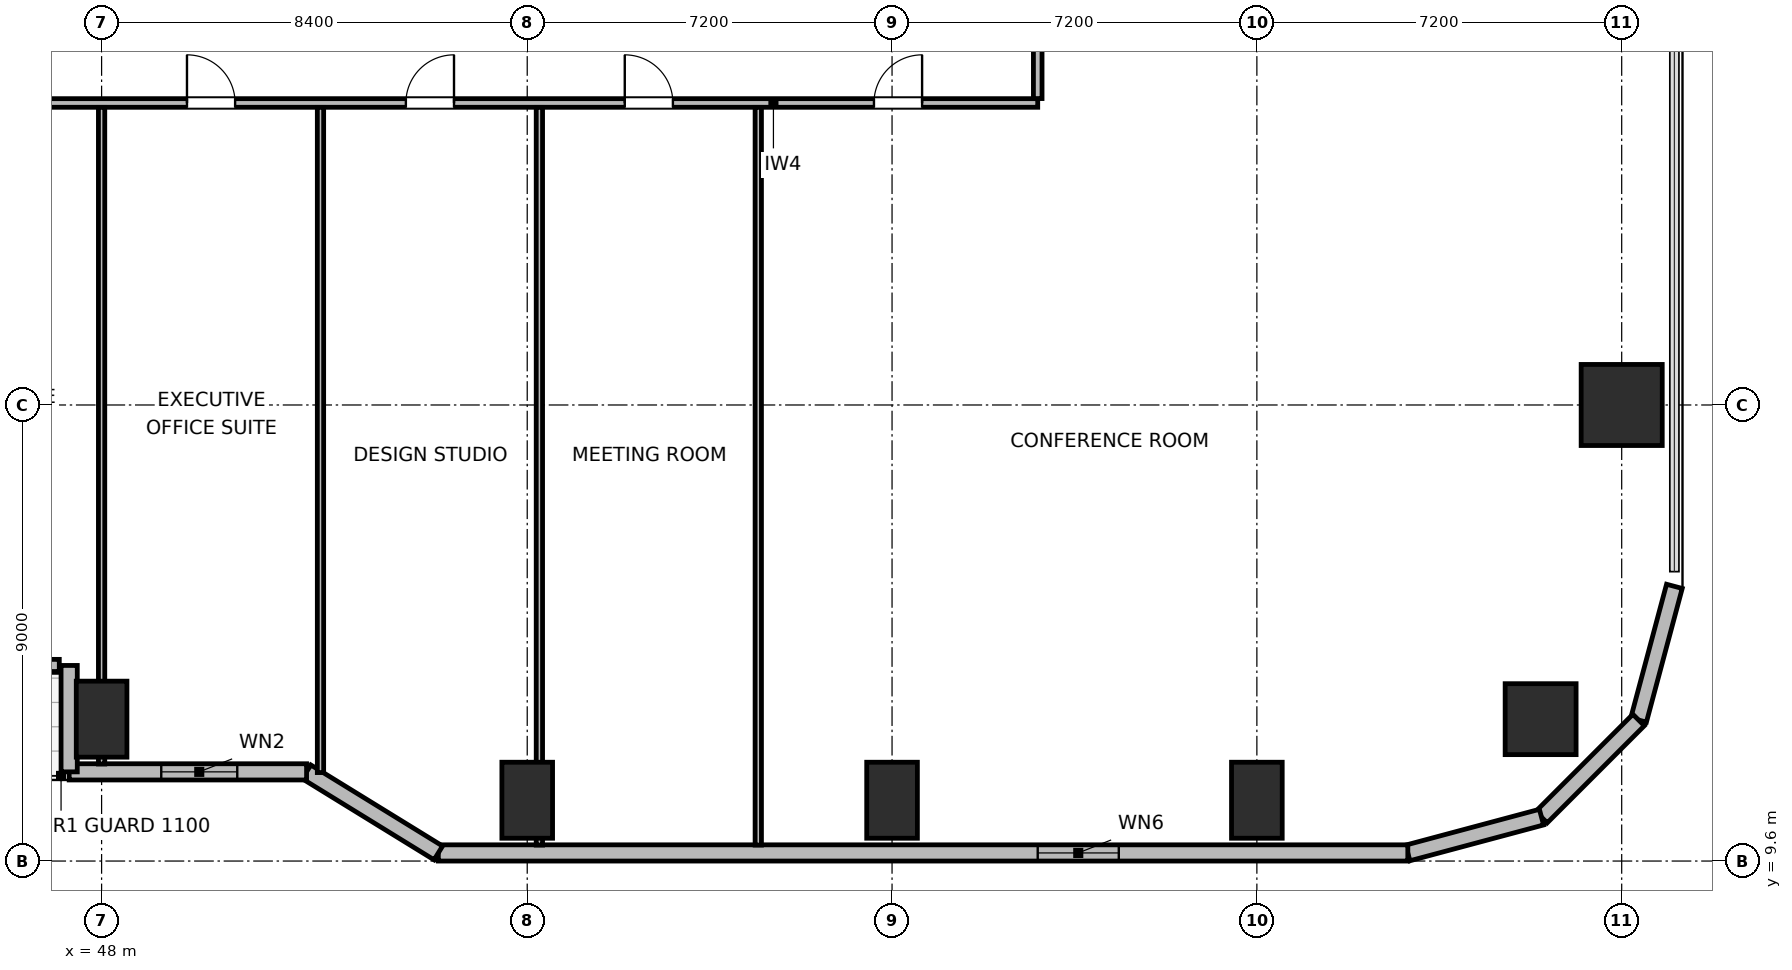
"""IFC4 building model, lengths in metres.
Left out: names, types, materials, properties, quantities, classifications, styles, units other than length and angle.
Written with IfcOpenShell. Run it as: python <this file> out.ifc"""

import sys

from ifc_helpers import new_model, si_unit, direction, frame, frame_2d, origin, origin_2d, place, context, subcontext, project, spatial, rectangle, circle, extrude, element, fill, save


model = new_model("IFC4")
c1 = context("Model", 3, precision=1e-05, world=origin(), true_north=direction((0.0, 1.0)))
c2 = subcontext(c1, "Body", "Model", "MODEL_VIEW")
j1 = project(units=[si_unit("LENGTHUNIT", "METRE"), si_unit("PLANEANGLEUNIT", "RADIAN")], contexts=[c1])
p1 = place(None, origin())
s1 = spatial("IfcSite", under=j1, at=p1, CompositionType="ELEMENT")
p2 = place(p1, origin())
s2 = spatial("IfcBuilding", under=s1, at=p2, CompositionType="ELEMENT")
p3 = place(p2, frame((0.0, 0.0, 60.6)))
s3 = spatial("IfcBuildingStorey", under=s2, at=p3, CompositionType="ELEMENT", Elevation=60.6)
p4 = place(p3, frame((76.4, 12.4, 0.0), z_axis=(0.0, 0.0, 1.0), x_axis=(1.0, 0.0, 0.0)))
e1 = element("IfcColumn", 1, at=p4, inside=s3, PredefinedType="COLUMN", context=c2, shape_type="SweptSolid", body=[
    extrude(circle(Radius=0.7, at=origin_2d()), origin(), (0.0, 0.0, 1.0), 3.9),
])
for number, where, z_axis, x_axis in (
    (2, (48.0, 12.4, 0.0), (0.0, 0.0, 1.0), (1.0, 0.0, 0.0)),
    (3, (56.4, 10.8, 0.0), (0.0, 0.0, 1.0), (1.0, 0.0, 0.0)),
    (4, (63.6, 10.8, 0.0), (0.0, 0.0, 1.0), (1.0, 0.0, 0.0)),
    (5, (70.8, 10.8, 0.0), (0.0, 0.0, 1.0), (1.0, 0.0, 0.0)),
):
    element("IfcColumn", number, at=place(p3, frame(where, z_axis=z_axis, x_axis=x_axis)), inside=s3, PredefinedType="COLUMN", context=c2, shape_type="SweptSolid", body=[
        extrude(rectangle(XDim=1.0, YDim=1.5, at=origin_2d()), origin(), (0.0, 0.0, 1.0), 3.9),
    ])
p5 = place(p3, frame((78.0, 18.6, 0.0), z_axis=(0.0, 0.0, 1.0), x_axis=(1.0, 0.0, 0.0)))
e6 = element("IfcColumn", 6, at=p5, inside=s3, PredefinedType="COLUMN", context=c2, shape_type="SweptSolid", body=[
    extrude(rectangle(XDim=1.6, YDim=1.6, at=origin_2d()), origin(), (0.0, 0.0, 1.0), 3.9),
])
p6 = place(p3, frame((79.04, 15.021, 0.0), z_axis=(0.0, 0.0, 1.0), x_axis=(-0.25869736047, -0.965958423373, 0.0)))
e7 = element("IfcWall", 7, at=p6, inside=s3, PredefinedType="SOLIDWALL", context=c2, shape_type="SweptSolid", body=[
    extrude(rectangle(XDim=2.731, YDim=0.32, at=frame_2d((1.366, 0.0))), origin(), (0.0, 0.0, 1.0), 3.64),
])
p7 = place(p3, frame((78.333, 12.383, 0.0), z_axis=(0.0, 0.0, 1.0), x_axis=(-0.707106781187, -0.707106781187, 0.0)))
e8 = element("IfcWall", 8, at=p7, inside=s3, PredefinedType="SOLIDWALL", context=c2, shape_type="SweptSolid", body=[
    extrude(rectangle(XDim=2.71, YDim=0.32, at=frame_2d((1.355, 0.0))), origin(), (0.0, 0.0, 1.0), 3.64),
])
p8 = place(p3, frame((76.417, 10.467, 0.0), z_axis=(0.0, 0.0, 1.0), x_axis=(-0.965964405026, -0.25867502435, 0.0)))
e9 = element("IfcWall", 9, at=p8, inside=s3, PredefinedType="SOLIDWALL", context=c2, shape_type="SweptSolid", body=[
    extrude(rectangle(XDim=2.731, YDim=0.32, at=frame_2d((1.366, 0.0))), origin(), (0.0, 0.0, 1.0), 3.64),
])
p9 = place(p3, frame((73.779, 9.76, 0.0), z_axis=(0.0, 0.0, 1.0), x_axis=(-1.0, 0.0, 0.0)))
e10 = element("IfcWall", 10, at=p9, inside=s3, PredefinedType="SOLIDWALL", context=c2, shape_type="SweptSolid", body=[
    extrude(rectangle(XDim=19.134, YDim=0.32, at=frame_2d((9.567, 0.0))), origin(), (0.0, 0.0, 1.0), 3.64),
])
p10 = place(p9, frame((5.704, 0.0, 0.85)))
e11 = element("IfcOpeningElement", 11, at=p10, cuts=e10, PredefinedType="OPENING", context=c2, shape_type="SweptSolid", body=[
    extrude(rectangle(XDim=1.6, YDim=1.0, at=frame_2d((0.8, 0.5))), frame((0.0, 0.17, 0.0), z_axis=(0.0, -1.0, 0.0), x_axis=(1.0, 0.0, 0.0)), (0.0, 0.0, 1.0), 0.34),
])
p11 = place(p3, frame((54.645, 9.76, 0.0), z_axis=(0.0, 0.0, 1.0), x_axis=(-0.851630857047, 0.524142044989, 0.0)))
e12 = element("IfcWall", 12, at=p11, inside=s3, PredefinedType="SOLIDWALL", context=c2, shape_type="SweptSolid", body=[
    extrude(rectangle(XDim=3.053, YDim=0.32, at=frame_2d((1.526, 0.0))), origin(), (0.0, 0.0, 1.0), 2.875),
])
p12 = place(p3, frame((52.045, 11.36, 0.0), z_axis=(0.0, 0.0, 1.0), x_axis=(-1.0, 0.0, 0.0)))
e13 = element("IfcWall", 13, at=p12, inside=s3, PredefinedType="SOLIDWALL", context=c2, shape_type="SweptSolid", body=[
    extrude(rectangle(XDim=4.685, YDim=0.32, at=frame_2d((2.343, 0.0))), origin(), (0.0, 0.0, 1.0), 2.875),
])
p13 = place(p12, frame((1.368, 0.0, 0.85)))
e14 = element("IfcOpeningElement", 14, at=p13, cuts=e13, PredefinedType="OPENING", context=c2, shape_type="SweptSolid", body=[
    extrude(rectangle(XDim=1.5, YDim=1.1, at=frame_2d((0.75, 0.55))), frame((0.0, 0.17, 0.0), z_axis=(0.0, -1.0, 0.0), x_axis=(1.0, 0.0, 0.0)), (0.0, 0.0, 1.0), 0.34),
])
p14 = place(p3, frame((47.36, 11.36, 0.0), z_axis=(0.0, 0.0, 1.0), x_axis=(0.0, 1.0, 0.0)))
e15 = element("IfcWall", 15, at=p14, inside=s3, PredefinedType="SOLIDWALL", context=c2, shape_type="SweptSolid", body=[
    extrude(rectangle(XDim=2.1, YDim=0.32, at=frame_2d((1.05, 0.0))), origin(), (0.0, 0.0, 1.0), 2.875),
])
p15 = place(p3, frame((47.165, 13.46, 0.0), z_axis=(0.0, 0.0, 1.0), x_axis=(-1.0, 0.0, 0.0)))
e16 = element("IfcWall", 16, at=p15, inside=s3, PredefinedType="SOLIDWALL", context=c2, shape_type="SweptSolid", body=[
    extrude(rectangle(XDim=4.53, YDim=0.24, at=frame_2d((2.265, 0.0))), origin(), (0.0, 0.0, 1.0), 3.64),
])
p16 = place(p15, frame((1.715, 0.0, 0.0)))
e17 = element("IfcOpeningElement", 17, at=p16, cuts=e16, PredefinedType="OPENING", context=c2, shape_type="SweptSolid", body=[
    extrude(rectangle(XDim=1.1, YDim=2.04, at=frame_2d((0.55, 1.02))), frame((0.0, 0.13, 0.0), z_axis=(0.0, -1.0, 0.0), x_axis=(1.0, 0.0, 0.0)), (0.0, 0.0, 1.0), 0.26),
])
p17 = place(p3, frame((29.525, 24.56, 0.0), z_axis=(0.0, 0.0, 1.0), x_axis=(1.0, 0.0, 0.0)))
e18 = element("IfcWall", 18, at=p17, inside=s3, PredefinedType="PARTITIONING", context=c2, shape_type="SweptSolid", body=[
    extrude(rectangle(XDim=36.95, YDim=0.17, at=frame_2d((18.475, 0.0))), origin(), (0.0, 0.0, 1.0), 3.64),
])
p18 = place(p17, frame((2.283, 0.0, 0.0)))
e19 = element("IfcOpeningElement", 19, at=p18, cuts=e18, PredefinedType="OPENING", context=c2, shape_type="SweptSolid", body=[
    extrude(rectangle(XDim=0.95, YDim=2.04, at=frame_2d((0.475, 1.02))), frame((0.0, 0.095, 0.0), z_axis=(0.0, -1.0, 0.0), x_axis=(1.0, 0.0, 0.0)), (0.0, 0.0, 1.0), 0.19),
])
p19 = place(p17, frame((7.2, 0.0, 0.0)))
e20 = element("IfcOpeningElement", 20, at=p19, cuts=e18, PredefinedType="OPENING", context=c2, shape_type="SweptSolid", body=[
    extrude(rectangle(XDim=0.95, YDim=2.04, at=frame_2d((0.475, 1.02))), frame((0.0, 0.095, 0.0), z_axis=(0.0, -1.0, 0.0), x_axis=(1.0, 0.0, 0.0)), (0.0, 0.0, 1.0), 0.19),
])
p20 = place(p17, frame((11.52, 0.0, 0.0)))
e21 = element("IfcOpeningElement", 21, at=p20, cuts=e18, PredefinedType="OPENING", context=c2, shape_type="SweptSolid", body=[
    extrude(rectangle(XDim=0.95, YDim=2.04, at=frame_2d((0.475, 1.02))), frame((0.0, 0.095, 0.0), z_axis=(0.0, -1.0, 0.0), x_axis=(1.0, 0.0, 0.0)), (0.0, 0.0, 1.0), 0.19),
])
p21 = place(p17, frame((15.84, 0.0, 0.0)))
e22 = element("IfcOpeningElement", 22, at=p21, cuts=e18, PredefinedType="OPENING", context=c2, shape_type="SweptSolid", body=[
    extrude(rectangle(XDim=0.95, YDim=2.04, at=frame_2d((0.475, 1.02))), frame((0.0, 0.095, 0.0), z_axis=(0.0, -1.0, 0.0), x_axis=(1.0, 0.0, 0.0)), (0.0, 0.0, 1.0), 0.19),
])
p22 = place(p17, frame((20.16, 0.0, 0.0)))
e23 = element("IfcOpeningElement", 23, at=p22, cuts=e18, PredefinedType="OPENING", context=c2, shape_type="SweptSolid", body=[
    extrude(rectangle(XDim=0.95, YDim=2.04, at=frame_2d((0.475, 1.02))), frame((0.0, 0.095, 0.0), z_axis=(0.0, -1.0, 0.0), x_axis=(1.0, 0.0, 0.0)), (0.0, 0.0, 1.0), 0.19),
])
p23 = place(p17, frame((24.48, 0.0, 0.0)))
e24 = element("IfcOpeningElement", 24, at=p23, cuts=e18, PredefinedType="OPENING", context=c2, shape_type="SweptSolid", body=[
    extrude(rectangle(XDim=0.95, YDim=2.04, at=frame_2d((0.475, 1.02))), frame((0.0, 0.095, 0.0), z_axis=(0.0, -1.0, 0.0), x_axis=(1.0, 0.0, 0.0)), (0.0, 0.0, 1.0), 0.19),
])
p24 = place(p17, frame((28.8, 0.0, 0.0)))
e25 = element("IfcOpeningElement", 25, at=p24, cuts=e18, PredefinedType="OPENING", context=c2, shape_type="SweptSolid", body=[
    extrude(rectangle(XDim=0.95, YDim=2.04, at=frame_2d((0.475, 1.02))), frame((0.0, 0.095, 0.0), z_axis=(0.0, -1.0, 0.0), x_axis=(1.0, 0.0, 0.0)), (0.0, 0.0, 1.0), 0.19),
])
p25 = place(p17, frame((33.718, 0.0, 0.0)))
e26 = element("IfcOpeningElement", 26, at=p25, cuts=e18, PredefinedType="OPENING", context=c2, shape_type="SweptSolid", body=[
    extrude(rectangle(XDim=0.95, YDim=2.04, at=frame_2d((0.475, 1.02))), frame((0.0, 0.095, 0.0), z_axis=(0.0, -1.0, 0.0), x_axis=(1.0, 0.0, 0.0)), (0.0, 0.0, 1.0), 0.19),
])
p26 = place(p3, frame((66.475, 24.647, 0.0), z_axis=(0.0, 0.0, 1.0), x_axis=(0.0, 1.0, 0.0)))
e27 = element("IfcWall", 27, at=p26, inside=s3, PredefinedType="PARTITIONING", context=c2, shape_type="SweptSolid", body=[
    extrude(rectangle(XDim=22.706, YDim=0.17, at=frame_2d((11.353, 0.0))), origin(), (0.0, 0.0, 1.0), 3.64),
])
p27 = place(p26, frame((5.758, 0.0, 0.0)))
e28 = element("IfcOpeningElement", 28, at=p27, cuts=e27, PredefinedType="OPENING", context=c2, shape_type="SweptSolid", body=[
    extrude(rectangle(XDim=0.95, YDim=2.04, at=frame_2d((0.475, 1.02))), frame((0.0, 0.095, 0.0), z_axis=(0.0, -1.0, 0.0), x_axis=(1.0, 0.0, 0.0)), (0.0, 0.0, 1.0), 0.19),
])
p28 = place(p26, frame((17.198, 0.0, 0.0)))
e29 = element("IfcOpeningElement", 29, at=p28, cuts=e27, PredefinedType="OPENING", context=c2, shape_type="SweptSolid", body=[
    extrude(rectangle(XDim=0.95, YDim=2.04, at=frame_2d((0.475, 1.02))), frame((0.0, 0.095, 0.0), z_axis=(0.0, -1.0, 0.0), x_axis=(1.0, 0.0, 0.0)), (0.0, 0.0, 1.0), 0.19),
])
p29 = place(p3, frame((48.0, 11.515, 0.0), z_axis=(0.0, 0.0, 1.0), x_axis=(0.0, 1.0, 0.0)))
e30 = element("IfcWall", 30, at=p29, inside=s3, PredefinedType="PARTITIONING", context=c2, shape_type="SweptSolid", body=[
    extrude(rectangle(XDim=12.958, YDim=0.125, at=frame_2d((6.479, 0.0))), origin(), (0.0, 0.0, 1.0), 2.93),
])
p30 = place(p3, frame((52.32, 11.346, 0.0), z_axis=(0.0, 0.0, 1.0), x_axis=(0.0, 1.0, 0.0)))
e31 = element("IfcWall", 31, at=p30, inside=s3, PredefinedType="PARTITIONING", context=c2, shape_type="SweptSolid", body=[
    extrude(rectangle(XDim=13.127, YDim=0.125, at=frame_2d((6.563, 0.0))), origin(), (0.0, 0.0, 1.0), 3.003),
])
p31 = place(p3, frame((56.64, 9.915, 0.0), z_axis=(0.0, 0.0, 1.0), x_axis=(0.0, 1.0, 0.0)))
e32 = element("IfcWall", 32, at=p31, inside=s3, PredefinedType="PARTITIONING", context=c2, shape_type="SweptSolid", body=[
    extrude(rectangle(XDim=14.558, YDim=0.125, at=frame_2d((7.279, 0.0))), origin(), (0.0, 0.0, 1.0), 2.93),
])
p32 = place(p3, frame((60.96, 9.915, 0.0), z_axis=(0.0, 0.0, 1.0), x_axis=(0.0, 1.0, 0.0)))
e33 = element("IfcWall", 33, at=p32, inside=s3, PredefinedType="PARTITIONING", context=c2, shape_type="SweptSolid", body=[
    extrude(rectangle(XDim=14.558, YDim=0.125, at=frame_2d((7.279, 0.0))), origin(), (0.0, 0.0, 1.0), 3.64),
])
p33 = place(p10, origin())
e34 = element("IfcWindow", 34, at=p33, inside=s3, PartitioningType="SINGLE_PANEL", PredefinedType="WINDOW", context=c2, shape_type="SweptSolid", body=[
    extrude(rectangle(XDim=1.6, YDim=1.0, at=frame_2d((0.8, 0.5))), frame((0.0, 0.03, 0.0), z_axis=(0.0, -1.0, 0.0), x_axis=(1.0, 0.0, 0.0)), (0.0, 0.0, 1.0), 0.06),
])
fill(e11, e34)
p34 = place(p13, origin())
e35 = element("IfcWindow", 35, at=p34, inside=s3, PartitioningType="SINGLE_PANEL", PredefinedType="WINDOW", context=c2, shape_type="SweptSolid", body=[
    extrude(rectangle(XDim=1.5, YDim=1.1, at=frame_2d((0.75, 0.55))), frame((0.0, 0.03, 0.0), z_axis=(0.0, -1.0, 0.0), x_axis=(1.0, 0.0, 0.0)), (0.0, 0.0, 1.0), 0.06),
])
fill(e14, e35)
p35 = place(p22, origin())
e36 = element("IfcDoor", 36, at=p35, inside=s3, OperationType="SINGLE_SWING_LEFT", PredefinedType="DOOR", context=c2, shape_type="SweptSolid", body=[
    extrude(rectangle(XDim=0.95, YDim=2.04, at=frame_2d((0.475, 1.02))), frame((0.0, 0.025, 0.0), z_axis=(0.0, -1.0, 0.0), x_axis=(1.0, 0.0, 0.0)), (0.0, 0.0, 1.0), 0.05),
])
fill(e23, e36)
p36 = place(p23, origin())
e37 = element("IfcDoor", 37, at=p36, inside=s3, OperationType="SINGLE_SWING_RIGHT", PredefinedType="DOOR", context=c2, shape_type="SweptSolid", body=[
    extrude(rectangle(XDim=0.95, YDim=2.04, at=frame_2d((0.475, 1.02))), frame((0.0, 0.025, 0.0), z_axis=(0.0, -1.0, 0.0), x_axis=(1.0, 0.0, 0.0)), (0.0, 0.0, 1.0), 0.05),
])
fill(e24, e37)
p37 = place(p24, origin())
e38 = element("IfcDoor", 38, at=p37, inside=s3, OperationType="SINGLE_SWING_LEFT", PredefinedType="DOOR", context=c2, shape_type="SweptSolid", body=[
    extrude(rectangle(XDim=0.95, YDim=2.04, at=frame_2d((0.475, 1.02))), frame((0.0, 0.025, 0.0), z_axis=(0.0, -1.0, 0.0), x_axis=(1.0, 0.0, 0.0)), (0.0, 0.0, 1.0), 0.05),
])
fill(e25, e38)
p38 = place(p25, origin())
e39 = element("IfcDoor", 39, at=p38, inside=s3, OperationType="SINGLE_SWING_RIGHT", PredefinedType="DOOR", context=c2, shape_type="SweptSolid", body=[
    extrude(rectangle(XDim=0.95, YDim=2.04, at=frame_2d((0.475, 1.02))), frame((0.0, 0.025, 0.0), z_axis=(0.0, -1.0, 0.0), x_axis=(1.0, 0.0, 0.0)), (0.0, 0.0, 1.0), 0.05),
])
fill(e26, e39)
save(model, sys.argv[1])
